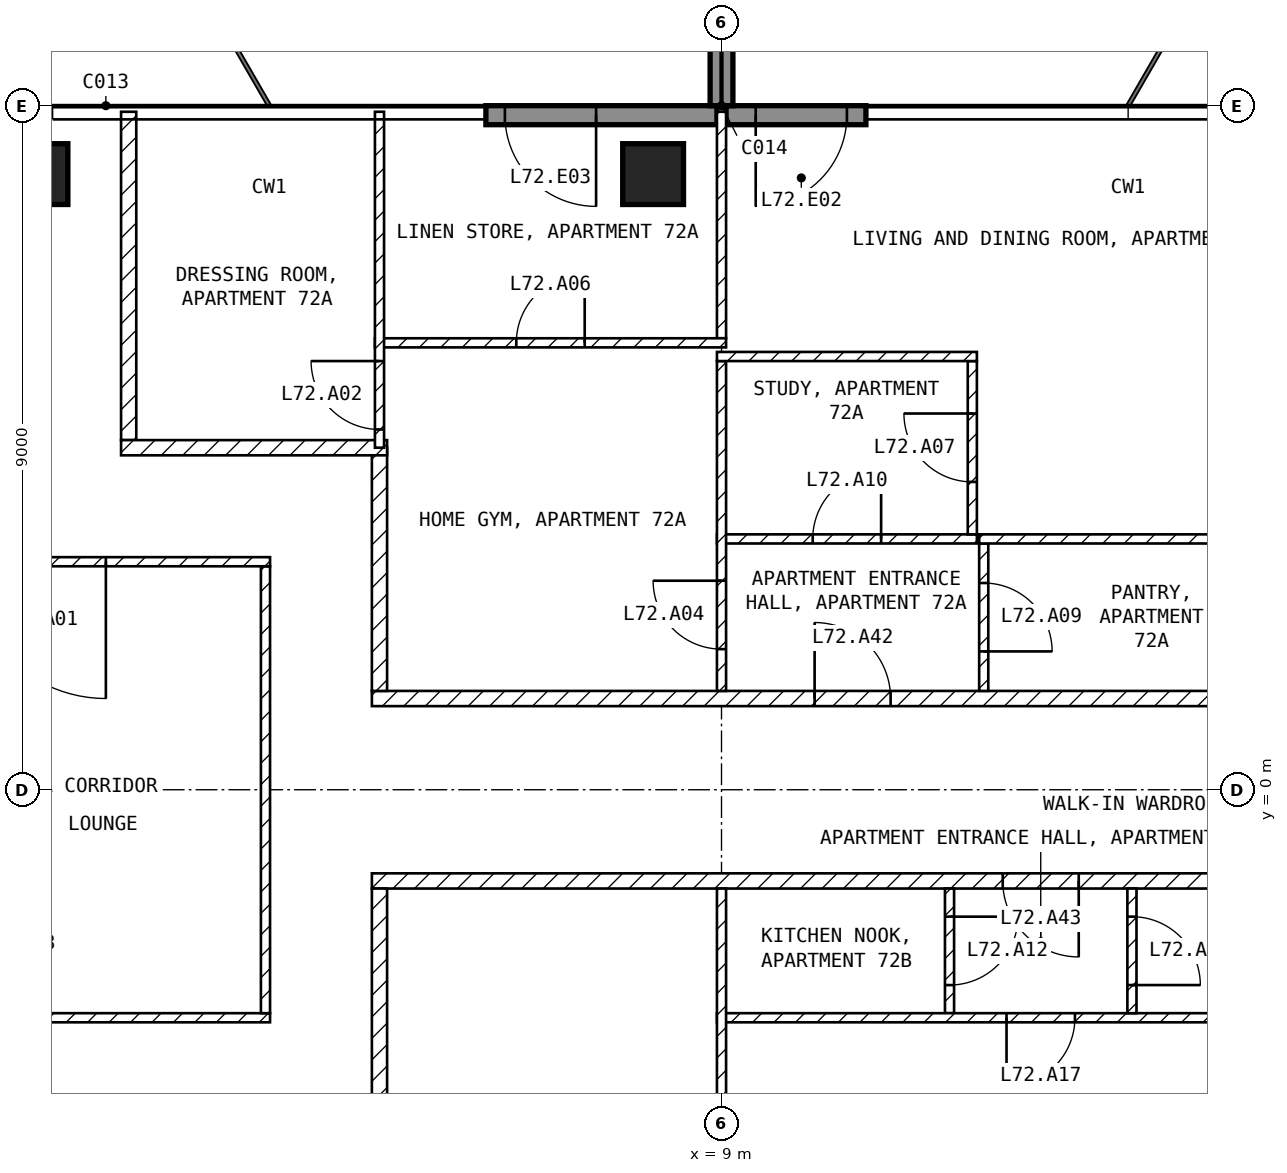
"""IFC4 building model, lengths in metres.
Left out: names, types, materials, properties, quantities, classifications, styles, units other than length and angle.
Written with IfcOpenShell. Run it as: python <this file> out.ifc"""

import sys

from ifc_helpers import new_model, si_unit, direction, frame, frame_2d, origin, origin_2d, place, context, subcontext, project, spatial, rectangle, extrude, element, fill, save


model = new_model("IFC4")
c1 = context("Model", 3, precision=1e-05, world=origin(), true_north=direction((0.0, 1.0)))
c2 = subcontext(c1, "Body", "Model", "MODEL_VIEW")
j1 = project(units=[si_unit("LENGTHUNIT", "METRE"), si_unit("PLANEANGLEUNIT", "RADIAN")], contexts=[c1])
p1 = place(None, origin())
s1 = spatial("IfcSite", under=j1, at=p1, CompositionType="ELEMENT")
p2 = place(p1, origin())
s2 = spatial("IfcBuilding", under=s1, at=p2, CompositionType="ELEMENT")
p3 = place(p2, frame((0.0, 0.0, 281.5)))
s3 = spatial("IfcBuildingStorey", under=s2, at=p3, CompositionType="ELEMENT", Elevation=281.5)
for number, where, z_axis, x_axis in (
    (1, (0.0, 8.1, -0.25), (0.0, 0.0, 1.0), (1.0, 0.0, 0.0)),
    (2, (8.1, 8.1, -0.25), (0.0, 0.0, 1.0), (1.0, 0.0, 0.0)),
):
    element("IfcColumn", number, at=place(p3, frame(where, z_axis=z_axis, x_axis=x_axis)), inside=s3, PredefinedType="COLUMN", context=c2, shape_type="SweptSolid", body=[
        extrude(rectangle(XDim=0.8, YDim=0.8, at=origin_2d()), origin(), (0.0, 0.0, 1.0), 3.45),
    ])
p4 = place(p3, frame((10.9, 8.875, 0.0), z_axis=(0.0, 0.0, 1.0), x_axis=(-1.0, 0.0, 0.0)))
e3 = element("IfcWall", 3, at=p4, inside=s3, PredefinedType="SOLIDWALL", context=c2, shape_type="SweptSolid", body=[
    extrude(rectangle(XDim=1.84, YDim=0.25, at=frame_2d((0.92, 0.0))), origin(), (0.0, 0.0, 1.0), 3.2),
])
p5 = place(p4, frame((0.25, 0.0, 0.0)))
e4 = element("IfcOpeningElement", 4, at=p5, cuts=e3, PredefinedType="OPENING", context=c2, shape_type="SweptSolid", body=[
    extrude(rectangle(XDim=1.2, YDim=2.4, at=frame_2d((0.6, 1.2))), frame((0.0, 0.135, 0.0), z_axis=(0.0, -1.0, 0.0), x_axis=(1.0, 0.0, 0.0)), (0.0, 0.0, 1.0), 0.27),
])
p6 = place(p3, frame((8.94, 8.875, 0.0), z_axis=(0.0, 0.0, 1.0), x_axis=(-1.0, 0.0, 0.0)))
e5 = element("IfcWall", 5, at=p6, inside=s3, PredefinedType="SOLIDWALL", context=c2, shape_type="SweptSolid", body=[
    extrude(rectangle(XDim=3.04, YDim=0.25, at=frame_2d((1.52, 0.0))), origin(), (0.0, 0.0, 1.0), 3.2),
])
p7 = place(p6, frame((1.59, 0.0, 0.0)))
e6 = element("IfcOpeningElement", 6, at=p7, cuts=e5, PredefinedType="OPENING", context=c2, shape_type="SweptSolid", body=[
    extrude(rectangle(XDim=1.2, YDim=2.4, at=frame_2d((0.6, 1.2))), frame((0.0, 0.135, 0.0), z_axis=(0.0, -1.0, 0.0), x_axis=(1.0, 0.0, 0.0)), (0.0, 0.0, 1.0), 0.27),
])
p8 = place(p3, frame((9.0, 9.0, 0.0), z_axis=(0.0, 0.0, 1.0), x_axis=(0.0, 1.0, 0.0)))
e7 = element("IfcWall", 7, at=p8, inside=s3, PredefinedType="SOLIDWALL", context=c2, shape_type="SweptSolid", body=[
    extrude(rectangle(XDim=2.7, YDim=0.3, at=frame_2d((1.35, 0.0))), origin(), (0.0, 0.0, 1.0), 3.2),
])
p9 = place(p3, frame((-3.06, -3.0, 0.0), z_axis=(0.0, 0.0, 1.0), x_axis=(1.0, 0.0, 0.0)))
e8 = element("IfcWall", 8, at=p9, inside=s3, PredefinedType="PARTITIONING", context=c2, shape_type="SweptSolid", body=[
    extrude(rectangle(XDim=6.12, YDim=0.12, at=frame_2d((3.06, 0.0))), origin(), (0.0, 0.0, 1.0), 3.2),
])
p10 = place(p3, frame((3.0, -2.94, 0.0), z_axis=(0.0, 0.0, 1.0), x_axis=(0.0, 1.0, 0.0)))
e9 = element("IfcWall", 9, at=p10, inside=s3, PredefinedType="PARTITIONING", context=c2, shape_type="SweptSolid", body=[
    extrude(rectangle(XDim=5.88, YDim=0.12, at=frame_2d((2.94, 0.0))), origin(), (0.0, 0.0, 1.0), 3.2),
])
p11 = place(p3, frame((3.06, 3.0, 0.0), z_axis=(0.0, 0.0, 1.0), x_axis=(-1.0, 0.0, 0.0)))
e10 = element("IfcWall", 10, at=p11, inside=s3, PredefinedType="PARTITIONING", context=c2, shape_type="SweptSolid", body=[
    extrude(rectangle(XDim=6.12, YDim=0.12, at=frame_2d((3.06, 0.0))), origin(), (0.0, 0.0, 1.0), 3.2),
])
p12 = place(p11, frame((2.16, 0.0, 0.0)))
e11 = element("IfcOpeningElement", 11, at=p12, cuts=e10, PredefinedType="OPENING", context=c2, shape_type="SweptSolid", body=[
    extrude(rectangle(XDim=1.8, YDim=2.1, at=frame_2d((0.9, 1.05))), frame((0.0, 0.07, 0.0), z_axis=(0.0, -1.0, 0.0), x_axis=(1.0, 0.0, 0.0)), (0.0, 0.0, 1.0), 0.14),
])
p13 = place(p3, frame((4.4, 1.2, 0.0), z_axis=(0.0, 0.0, 1.0), x_axis=(1.0, 0.0, 0.0)))
e12 = element("IfcWall", 12, at=p13, inside=s3, PredefinedType="PARTITIONING", context=c2, shape_type="SweptSolid", body=[
    extrude(rectangle(XDim=17.2, YDim=0.2, at=frame_2d((8.6, 0.0))), origin(), (0.0, 0.0, 1.0), 3.2),
])
p14 = place(p13, frame((5.825, 0.0, 0.0)))
e13 = element("IfcOpeningElement", 13, at=p14, cuts=e12, PredefinedType="OPENING", context=c2, shape_type="SweptSolid", body=[
    extrude(rectangle(XDim=1.0, YDim=2.1, at=frame_2d((0.5, 1.05))), frame((0.0, 0.11, 0.0), z_axis=(0.0, -1.0, 0.0), x_axis=(1.0, 0.0, 0.0)), (0.0, 0.0, 1.0), 0.22),
])
p15 = place(p3, frame((4.5, 4.5, 0.0), z_axis=(0.0, 0.0, 1.0), x_axis=(0.0, -1.0, 0.0)))
e14 = element("IfcWall", 14, at=p15, inside=s3, PredefinedType="PARTITIONING", context=c2, shape_type="SweptSolid", body=[
    extrude(rectangle(XDim=3.2, YDim=0.2, at=frame_2d((1.6, 0.0))), origin(), (0.0, 0.0, 1.0), 3.2),
])
p16 = place(p3, frame((1.2, 8.92, 0.0), z_axis=(0.0, 0.0, 1.0), x_axis=(0.0, -1.0, 0.0)))
e15 = element("IfcWall", 15, at=p16, inside=s3, PredefinedType="PARTITIONING", context=c2, shape_type="SweptSolid", body=[
    extrude(rectangle(XDim=4.32, YDim=0.2, at=frame_2d((2.16, 0.0))), origin(), (0.0, 0.0, 1.0), 3.2),
])
p17 = place(p3, frame((1.1, 4.5, 0.0), z_axis=(0.0, 0.0, 1.0), x_axis=(1.0, 0.0, 0.0)))
e16 = element("IfcWall", 16, at=p17, inside=s3, PredefinedType="PARTITIONING", context=c2, shape_type="SweptSolid", body=[
    extrude(rectangle(XDim=3.5, YDim=0.2, at=frame_2d((1.75, 0.0))), origin(), (0.0, 0.0, 1.0), 3.2),
])
p18 = place(p3, frame((21.6, -1.2, 0.0), z_axis=(0.0, 0.0, 1.0), x_axis=(-1.0, 0.0, 0.0)))
e17 = element("IfcWall", 17, at=p18, inside=s3, PredefinedType="PARTITIONING", context=c2, shape_type="SweptSolid", body=[
    extrude(rectangle(XDim=17.2, YDim=0.2, at=frame_2d((8.6, 0.0))), origin(), (0.0, 0.0, 1.0), 3.2),
])
p19 = place(p18, frame((7.9, 0.0, 0.0)))
e18 = element("IfcOpeningElement", 18, at=p19, cuts=e17, PredefinedType="OPENING", context=c2, shape_type="SweptSolid", body=[
    extrude(rectangle(XDim=1.0, YDim=2.1, at=frame_2d((0.5, 1.05))), frame((0.0, 0.11, 0.0), z_axis=(0.0, -1.0, 0.0), x_axis=(1.0, 0.0, 0.0)), (0.0, 0.0, 1.0), 0.22),
])
p20 = place(p3, frame((4.5, -1.3, 0.0), z_axis=(0.0, 0.0, 1.0), x_axis=(0.0, -1.0, 0.0)))
e19 = element("IfcWall", 19, at=p20, inside=s3, PredefinedType="PARTITIONING", context=c2, shape_type="SweptSolid", body=[
    extrude(rectangle(XDim=3.2, YDim=0.2, at=frame_2d((1.6, 0.0))), origin(), (0.0, 0.0, 1.0), 3.2),
])
p21 = place(p3, frame((12.45, 3.24, 0.0), z_axis=(0.0, 0.0, 1.0), x_axis=(0.0, -1.0, 0.0)))
e20 = element("IfcWall", 20, at=p21, inside=s3, PredefinedType="PARTITIONING", context=c2, shape_type="SweptSolid", body=[
    extrude(rectangle(XDim=1.94, YDim=0.12, at=frame_2d((0.97, 0.0))), origin(), (0.0, 0.0, 1.0), 3.2),
])
p22 = place(p21, frame((0.52, 0.0, 0.0)))
e21 = element("IfcOpeningElement", 21, at=p22, cuts=e20, PredefinedType="OPENING", context=c2, shape_type="SweptSolid", body=[
    extrude(rectangle(XDim=0.9, YDim=2.1, at=frame_2d((0.45, 1.05))), frame((0.0, 0.07, 0.0), z_axis=(0.0, -1.0, 0.0), x_axis=(1.0, 0.0, 0.0)), (0.0, 0.0, 1.0), 0.14),
])
p23 = place(p3, frame((8.94, 3.3, 0.0), z_axis=(0.0, 0.0, 1.0), x_axis=(1.0, 0.0, 0.0)))
e22 = element("IfcWall", 22, at=p23, inside=s3, PredefinedType="PARTITIONING", context=c2, shape_type="SweptSolid", body=[
    extrude(rectangle(XDim=3.42, YDim=0.12, at=frame_2d((1.71, 0.0))), origin(), (0.0, 0.0, 1.0), 3.2),
])
p24 = place(p23, frame((1.26, 0.0, 0.0)))
e23 = element("IfcOpeningElement", 23, at=p24, cuts=e22, PredefinedType="OPENING", context=c2, shape_type="SweptSolid", body=[
    extrude(rectangle(XDim=0.9, YDim=2.1, at=frame_2d((0.45, 1.05))), frame((0.0, 0.07, 0.0), z_axis=(0.0, -1.0, 0.0), x_axis=(1.0, 0.0, 0.0)), (0.0, 0.0, 1.0), 0.14),
])
p25 = place(p3, frame((9.0, 1.3, 0.0), z_axis=(0.0, 0.0, 1.0), x_axis=(0.0, 1.0, 0.0)))
e24 = element("IfcWall", 24, at=p25, inside=s3, PredefinedType="PARTITIONING", context=c2, shape_type="SweptSolid", body=[
    extrude(rectangle(XDim=4.34, YDim=0.12, at=frame_2d((2.17, 0.0))), origin(), (0.0, 0.0, 1.0), 3.2),
])
p26 = place(p25, frame((0.55, 0.0, 0.0)))
e25 = element("IfcOpeningElement", 25, at=p26, cuts=e24, PredefinedType="OPENING", context=c2, shape_type="SweptSolid", body=[
    extrude(rectangle(XDim=0.9, YDim=2.1, at=frame_2d((0.45, 1.05))), frame((0.0, 0.07, 0.0), z_axis=(0.0, -1.0, 0.0), x_axis=(1.0, 0.0, 0.0)), (0.0, 0.0, 1.0), 0.14),
])
p27 = place(p3, frame((12.39, 3.3, 0.0), z_axis=(0.0, 0.0, 1.0), x_axis=(1.0, 0.0, 0.0)))
e26 = element("IfcWall", 26, at=p27, inside=s3, PredefinedType="PARTITIONING", context=c2, shape_type="SweptSolid", body=[
    extrude(rectangle(XDim=6.81, YDim=0.12, at=frame_2d((3.405, 0.0))), origin(), (0.0, 0.0, 1.0), 3.2),
])
p28 = place(p27, frame((3.96, 0.0, 0.0)))
e27 = element("IfcOpeningElement", 27, at=p28, cuts=e26, PredefinedType="OPENING", context=c2, shape_type="SweptSolid", body=[
    extrude(rectangle(XDim=0.9, YDim=2.1, at=frame_2d((0.45, 1.05))), frame((0.0, 0.07, 0.0), z_axis=(0.0, -1.0, 0.0), x_axis=(1.0, 0.0, 0.0)), (0.0, 0.0, 1.0), 0.14),
])
p29 = place(p3, frame((12.3, 3.36, 0.0), z_axis=(0.0, 0.0, 1.0), x_axis=(0.0, 1.0, 0.0)))
e28 = element("IfcWall", 28, at=p29, inside=s3, PredefinedType="PARTITIONING", context=c2, shape_type="SweptSolid", body=[
    extrude(rectangle(XDim=2.28, YDim=0.12, at=frame_2d((1.14, 0.0))), origin(), (0.0, 0.0, 1.0), 3.2),
])
p30 = place(p29, frame((0.69, 0.0, 0.0)))
e29 = element("IfcOpeningElement", 29, at=p30, cuts=e28, PredefinedType="OPENING", context=c2, shape_type="SweptSolid", body=[
    extrude(rectangle(XDim=0.9, YDim=2.1, at=frame_2d((0.45, 1.05))), frame((0.0, 0.07, 0.0), z_axis=(0.0, -1.0, 0.0), x_axis=(1.0, 0.0, 0.0)), (0.0, 0.0, 1.0), 0.14),
])
p31 = place(p3, frame((12.36, 5.7, 0.0), z_axis=(0.0, 0.0, 1.0), x_axis=(-1.0, 0.0, 0.0)))
e30 = element("IfcWall", 30, at=p31, inside=s3, PredefinedType="PARTITIONING", context=c2, shape_type="SweptSolid", body=[
    extrude(rectangle(XDim=3.42, YDim=0.12, at=frame_2d((1.71, 0.0))), origin(), (0.0, 0.0, 1.0), 3.2),
])
p32 = place(p3, frame((9.0, 5.94, 0.0), z_axis=(0.0, 0.0, 1.0), x_axis=(0.0, 1.0, 0.0)))
e31 = element("IfcWall", 31, at=p32, inside=s3, PredefinedType="PARTITIONING", context=c2, shape_type="SweptSolid", body=[
    extrude(rectangle(XDim=2.98, YDim=0.12, at=frame_2d((1.49, 0.0))), origin(), (0.0, 0.0, 1.0), 3.2),
])
p33 = place(p3, frame((4.44, 5.88, 0.0), z_axis=(0.0, 0.0, 1.0), x_axis=(1.0, 0.0, 0.0)))
e32 = element("IfcWall", 32, at=p33, inside=s3, PredefinedType="PARTITIONING", context=c2, shape_type="SweptSolid", body=[
    extrude(rectangle(XDim=4.62, YDim=0.12, at=frame_2d((2.31, 0.0))), origin(), (0.0, 0.0, 1.0), 3.2),
])
p34 = place(p33, frame((1.86, 0.0, 0.0)))
e33 = element("IfcOpeningElement", 33, at=p34, cuts=e32, PredefinedType="OPENING", context=c2, shape_type="SweptSolid", body=[
    extrude(rectangle(XDim=0.9, YDim=2.1, at=frame_2d((0.45, 1.05))), frame((0.0, 0.07, 0.0), z_axis=(0.0, -1.0, 0.0), x_axis=(1.0, 0.0, 0.0)), (0.0, 0.0, 1.0), 0.14),
])
p35 = place(p3, frame((4.5, 4.5, 0.0), z_axis=(0.0, 0.0, 1.0), x_axis=(0.0, 1.0, 0.0)))
e34 = element("IfcWall", 34, at=p35, inside=s3, PredefinedType="PARTITIONING", context=c2, shape_type="SweptSolid", body=[
    extrude(rectangle(XDim=4.42, YDim=0.12, at=frame_2d((2.21, 0.0))), origin(), (0.0, 0.0, 1.0), 3.2),
])
p36 = place(p35, frame((0.24, 0.0, 0.0)))
e35 = element("IfcOpeningElement", 35, at=p36, cuts=e34, PredefinedType="OPENING", context=c2, shape_type="SweptSolid", body=[
    extrude(rectangle(XDim=0.9, YDim=2.1, at=frame_2d((0.45, 1.05))), frame((0.0, 0.07, 0.0), z_axis=(0.0, -1.0, 0.0), x_axis=(1.0, 0.0, 0.0)), (0.0, 0.0, 1.0), 0.14),
])
p37 = place(p3, frame((12.0, -1.3, 0.0), z_axis=(0.0, 0.0, 1.0), x_axis=(0.0, -1.0, 0.0)))
e36 = element("IfcWall", 36, at=p37, inside=s3, PredefinedType="PARTITIONING", context=c2, shape_type="SweptSolid", body=[
    extrude(rectangle(XDim=1.64, YDim=0.12, at=frame_2d((0.82, 0.0))), origin(), (0.0, 0.0, 1.0), 3.2),
])
p38 = place(p37, frame((0.37, 0.0, 0.0)))
e37 = element("IfcOpeningElement", 37, at=p38, cuts=e36, PredefinedType="OPENING", context=c2, shape_type="SweptSolid", body=[
    extrude(rectangle(XDim=0.9, YDim=2.1, at=frame_2d((0.45, 1.05))), frame((0.0, 0.07, 0.0), z_axis=(0.0, -1.0, 0.0), x_axis=(1.0, 0.0, 0.0)), (0.0, 0.0, 1.0), 0.14),
])
p39 = place(p3, frame((16.8, -3.0, 0.0), z_axis=(0.0, 0.0, 1.0), x_axis=(-1.0, 0.0, 0.0)))
e38 = element("IfcWall", 38, at=p39, inside=s3, PredefinedType="PARTITIONING", context=c2, shape_type="SweptSolid", body=[
    extrude(rectangle(XDim=7.86, YDim=0.12, at=frame_2d((3.93, 0.0))), origin(), (0.0, 0.0, 1.0), 3.2),
])
p40 = place(p39, frame((3.15, 0.0, 0.0)))
e39 = element("IfcOpeningElement", 39, at=p40, cuts=e38, PredefinedType="OPENING", context=c2, shape_type="SweptSolid", body=[
    extrude(rectangle(XDim=0.9, YDim=2.1, at=frame_2d((0.45, 1.05))), frame((0.0, 0.07, 0.0), z_axis=(0.0, -1.0, 0.0), x_axis=(1.0, 0.0, 0.0)), (0.0, 0.0, 1.0), 0.14),
])
p41 = place(p3, frame((9.0, -8.92, 0.0), z_axis=(0.0, 0.0, 1.0), x_axis=(0.0, 1.0, 0.0)))
e40 = element("IfcWall", 40, at=p41, inside=s3, PredefinedType="PARTITIONING", context=c2, shape_type="SweptSolid", body=[
    extrude(rectangle(XDim=7.62, YDim=0.12, at=frame_2d((3.81, 0.0))), origin(), (0.0, 0.0, 1.0), 3.2),
])
p42 = place(p41, frame((2.62, 0.0, 0.0)))
e41 = element("IfcOpeningElement", 41, at=p42, cuts=e40, PredefinedType="OPENING", context=c2, shape_type="SweptSolid", body=[
    extrude(rectangle(XDim=0.9, YDim=2.1, at=frame_2d((0.45, 1.05))), frame((0.0, 0.07, 0.0), z_axis=(0.0, -1.0, 0.0), x_axis=(1.0, 0.0, 0.0)), (0.0, 0.0, 1.0), 0.14),
])
p43 = place(p3, frame((14.4, -1.3, 0.0), z_axis=(0.0, 0.0, 1.0), x_axis=(0.0, -1.0, 0.0)))
e42 = element("IfcWall", 42, at=p43, inside=s3, PredefinedType="PARTITIONING", context=c2, shape_type="SweptSolid", body=[
    extrude(rectangle(XDim=1.64, YDim=0.12, at=frame_2d((0.82, 0.0))), origin(), (0.0, 0.0, 1.0), 3.2),
])
p44 = place(p43, frame((0.37, 0.0, 0.0)))
e43 = element("IfcOpeningElement", 43, at=p44, cuts=e42, PredefinedType="OPENING", context=c2, shape_type="SweptSolid", body=[
    extrude(rectangle(XDim=0.9, YDim=2.1, at=frame_2d((0.45, 1.05))), frame((0.0, 0.07, 0.0), z_axis=(0.0, -1.0, 0.0), x_axis=(1.0, 0.0, 0.0)), (0.0, 0.0, 1.0), 0.14),
])
p45 = place(p5, origin())
e44 = element("IfcDoor", 44, at=p45, inside=s3, OperationType="SINGLE_SWING_RIGHT", PredefinedType="DOOR", context=c2, shape_type="SweptSolid", body=[
    extrude(rectangle(XDim=1.2, YDim=2.4, at=frame_2d((0.6, 1.2))), frame((0.0, 0.025, 0.0), z_axis=(0.0, -1.0, 0.0), x_axis=(1.0, 0.0, 0.0)), (0.0, 0.0, 1.0), 0.05),
])
fill(e4, e44)
p46 = place(p7, origin())
e45 = element("IfcDoor", 45, at=p46, inside=s3, OperationType="SINGLE_SWING_LEFT", PredefinedType="DOOR", context=c2, shape_type="SweptSolid", body=[
    extrude(rectangle(XDim=1.2, YDim=2.4, at=frame_2d((0.6, 1.2))), frame((0.0, 0.025, 0.0), z_axis=(0.0, -1.0, 0.0), x_axis=(1.0, 0.0, 0.0)), (0.0, 0.0, 1.0), 0.05),
])
fill(e6, e45)
p47 = place(p12, origin())
e46 = element("IfcDoor", 46, at=p47, inside=s3, OperationType="SINGLE_SWING_LEFT", PredefinedType="DOOR", context=c2, shape_type="SweptSolid", body=[
    extrude(rectangle(XDim=1.8, YDim=2.1, at=frame_2d((0.9, 1.05))), frame((0.0, 0.025, 0.0), z_axis=(0.0, -1.0, 0.0), x_axis=(1.0, 0.0, 0.0)), (0.0, 0.0, 1.0), 0.05),
])
fill(e11, e46)
p48 = place(p36, origin())
e47 = element("IfcDoor", 47, at=p48, inside=s3, OperationType="SINGLE_SWING_RIGHT", PredefinedType="DOOR", context=c2, shape_type="SweptSolid", body=[
    extrude(rectangle(XDim=0.9, YDim=2.1, at=frame_2d((0.45, 1.05))), frame((0.0, 0.025, 0.0), z_axis=(0.0, -1.0, 0.0), x_axis=(1.0, 0.0, 0.0)), (0.0, 0.0, 1.0), 0.05),
])
fill(e35, e47)
p49 = place(p26, origin())
e48 = element("IfcDoor", 48, at=p49, inside=s3, OperationType="SINGLE_SWING_RIGHT", PredefinedType="DOOR", context=c2, shape_type="SweptSolid", body=[
    extrude(rectangle(XDim=0.9, YDim=2.1, at=frame_2d((0.45, 1.05))), frame((0.0, 0.025, 0.0), z_axis=(0.0, -1.0, 0.0), x_axis=(1.0, 0.0, 0.0)), (0.0, 0.0, 1.0), 0.05),
])
fill(e25, e48)
p50 = place(p34, origin())
e49 = element("IfcDoor", 49, at=p50, inside=s3, OperationType="SINGLE_SWING_RIGHT", PredefinedType="DOOR", context=c2, shape_type="SweptSolid", body=[
    extrude(rectangle(XDim=0.9, YDim=2.1, at=frame_2d((0.45, 1.05))), frame((0.0, 0.025, 0.0), z_axis=(0.0, -1.0, 0.0), x_axis=(1.0, 0.0, 0.0)), (0.0, 0.0, 1.0), 0.05),
])
fill(e33, e49)
p51 = place(p30, origin())
e50 = element("IfcDoor", 50, at=p51, inside=s3, OperationType="SINGLE_SWING_RIGHT", PredefinedType="DOOR", context=c2, shape_type="SweptSolid", body=[
    extrude(rectangle(XDim=0.9, YDim=2.1, at=frame_2d((0.45, 1.05))), frame((0.0, 0.025, 0.0), z_axis=(0.0, -1.0, 0.0), x_axis=(1.0, 0.0, 0.0)), (0.0, 0.0, 1.0), 0.05),
])
fill(e29, e50)
p52 = place(p22, origin())
e51 = element("IfcDoor", 51, at=p52, inside=s3, OperationType="SINGLE_SWING_RIGHT", PredefinedType="DOOR", context=c2, shape_type="SweptSolid", body=[
    extrude(rectangle(XDim=0.9, YDim=2.1, at=frame_2d((0.45, 1.05))), frame((0.0, 0.025, 0.0), z_axis=(0.0, -1.0, 0.0), x_axis=(1.0, 0.0, 0.0)), (0.0, 0.0, 1.0), 0.05),
])
fill(e21, e51)
p53 = place(p24, origin())
e52 = element("IfcDoor", 52, at=p53, inside=s3, OperationType="SINGLE_SWING_RIGHT", PredefinedType="DOOR", context=c2, shape_type="SweptSolid", body=[
    extrude(rectangle(XDim=0.9, YDim=2.1, at=frame_2d((0.45, 1.05))), frame((0.0, 0.025, 0.0), z_axis=(0.0, -1.0, 0.0), x_axis=(1.0, 0.0, 0.0)), (0.0, 0.0, 1.0), 0.05),
])
fill(e23, e52)
p54 = place(p38, origin())
e53 = element("IfcDoor", 53, at=p54, inside=s3, OperationType="SINGLE_SWING_LEFT", PredefinedType="DOOR", context=c2, shape_type="SweptSolid", body=[
    extrude(rectangle(XDim=0.9, YDim=2.1, at=frame_2d((0.45, 1.05))), frame((0.0, 0.025, 0.0), z_axis=(0.0, -1.0, 0.0), x_axis=(1.0, 0.0, 0.0)), (0.0, 0.0, 1.0), 0.05),
])
fill(e37, e53)
p55 = place(p40, origin())
e54 = element("IfcDoor", 54, at=p55, inside=s3, OperationType="SINGLE_SWING_RIGHT", PredefinedType="DOOR", context=c2, shape_type="SweptSolid", body=[
    extrude(rectangle(XDim=0.9, YDim=2.1, at=frame_2d((0.45, 1.05))), frame((0.0, 0.025, 0.0), z_axis=(0.0, -1.0, 0.0), x_axis=(1.0, 0.0, 0.0)), (0.0, 0.0, 1.0), 0.05),
])
fill(e39, e54)
p56 = place(p44, origin())
e55 = element("IfcDoor", 55, at=p56, inside=s3, OperationType="SINGLE_SWING_RIGHT", PredefinedType="DOOR", context=c2, shape_type="SweptSolid", body=[
    extrude(rectangle(XDim=0.9, YDim=2.1, at=frame_2d((0.45, 1.05))), frame((0.0, 0.025, 0.0), z_axis=(0.0, -1.0, 0.0), x_axis=(1.0, 0.0, 0.0)), (0.0, 0.0, 1.0), 0.05),
])
fill(e43, e55)
p57 = place(p14, origin())
e56 = element("IfcDoor", 56, at=p57, inside=s3, OperationType="SINGLE_SWING_LEFT", PredefinedType="DOOR", context=c2, shape_type="SweptSolid", body=[
    extrude(rectangle(XDim=1.0, YDim=2.1, at=frame_2d((0.5, 1.05))), frame((0.0, 0.025, 0.0), z_axis=(0.0, -1.0, 0.0), x_axis=(1.0, 0.0, 0.0)), (0.0, 0.0, 1.0), 0.05),
])
fill(e13, e56)
p58 = place(p19, origin())
e57 = element("IfcDoor", 57, at=p58, inside=s3, OperationType="SINGLE_SWING_LEFT", PredefinedType="DOOR", context=c2, shape_type="SweptSolid", body=[
    extrude(rectangle(XDim=1.0, YDim=2.1, at=frame_2d((0.5, 1.05))), frame((0.0, 0.025, 0.0), z_axis=(0.0, -1.0, 0.0), x_axis=(1.0, 0.0, 0.0)), (0.0, 0.0, 1.0), 0.05),
])
fill(e18, e57)
save(model, sys.argv[1])
